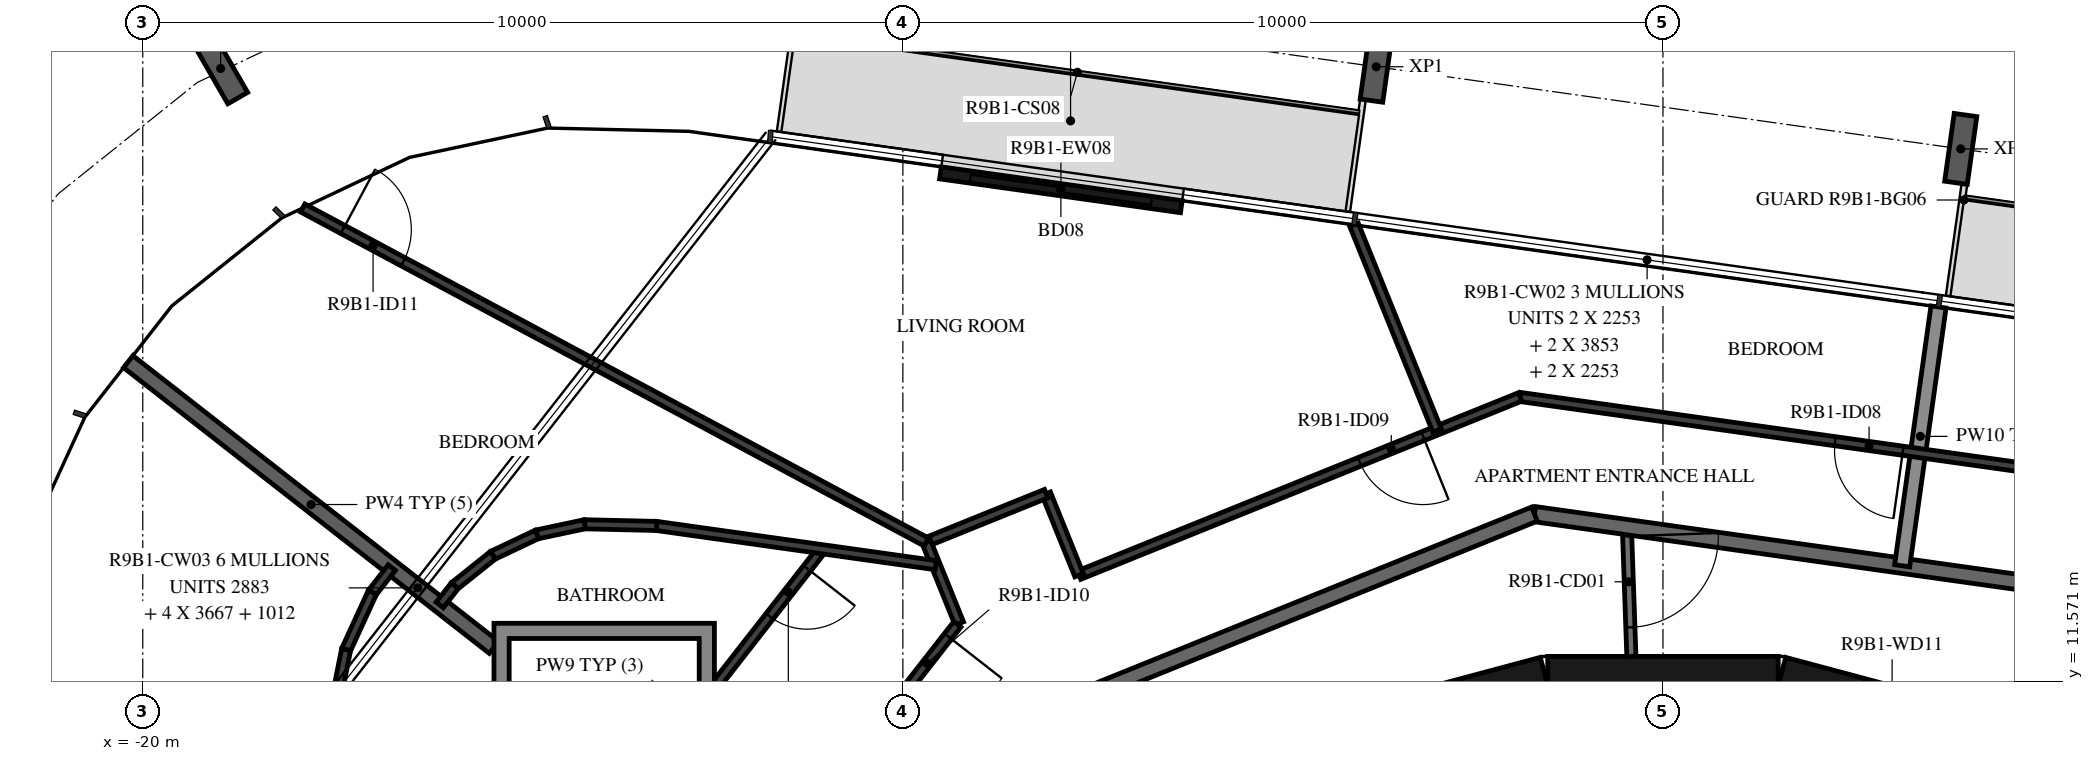
"""IFC4 building model, lengths in metres.
Left out: names, types, materials, properties, quantities, classifications, styles, units other than length and angle.
Written with IfcOpenShell. Run it as: python <this file> out.ifc"""

import sys

from ifc_helpers import new_model, si_unit, direction, frame, frame_2d, origin, origin_2d, place, context, subcontext, project, spatial, polyline, rectangle, i_section, outline, extrude, element, fill, save


model = new_model("IFC4")
c1 = context("Model", 3, precision=1e-05, world=origin(), true_north=direction((0.0, 1.0)))
c2 = subcontext(c1, "Body", "Model", "MODEL_VIEW")
j1 = project(units=[si_unit("LENGTHUNIT", "METRE"), si_unit("PLANEANGLEUNIT", "RADIAN")], contexts=[c1])
p1 = place(None, origin())
s1 = spatial("IfcSite", under=j1, at=p1, CompositionType="ELEMENT")
p2 = place(p1, origin())
s2 = spatial("IfcBuilding", under=s1, at=p2, CompositionType="ELEMENT")
p3 = place(p2, frame((0.0, 0.0, 350.5)))
s3 = spatial("IfcBuildingStorey", under=s2, at=p3, CompositionType="ELEMENT", Elevation=350.5)
for number, where, z_axis, x_axis in (
    (1, (3.917, 18.574, -0.38), (0.0, 0.0, 1.0), (0.99, -0.139, 0.0)),
    (2, (-3.773, 19.655, -0.38), (0.0, 0.0, 1.0), (0.99, -0.139, 0.0)),
    (3, (-18.976, 19.632, -0.38), (0.0, 0.0, 1.0), (0.866, 0.5, 0.0)),
):
    element("IfcColumn", number, at=place(p3, frame(where, z_axis=z_axis, x_axis=x_axis)), inside=s3, PredefinedType="COLUMN", context=c2, shape_type="SweptSolid", body=[
        extrude(i_section(OverallWidth=0.3, OverallDepth=0.9, WebThickness=0.019, FlangeThickness=0.035, FilletRadius=0.03, at=origin_2d()), origin(), (0.0, 0.0, 1.0), 3.5),
    ])
p4 = place(p3, frame((-6.337, 17.814, 0.0), z_axis=(0.0, 0.0, 1.0), x_axis=(-0.99026890462, 0.13916715325, 0.0)))
e4 = element("IfcWall", 4, at=p4, inside=s3, PredefinedType="STANDARD", context=c2, shape_type="SweptSolid", body=[
    extrude(rectangle(XDim=3.2, YDim=0.16, at=frame_2d((1.6, 0.0))), origin(), (0.0, 0.0, 1.0), 3.12),
])
p5 = place(p4, frame((0.4, 0.0, 0.0)))
e5 = element("IfcOpeningElement", 5, at=p5, cuts=e4, PredefinedType="OPENING", context=c2, shape_type="SweptSolid", body=[
    extrude(rectangle(XDim=2.4, YDim=2.4, at=frame_2d((1.2, 1.2))), frame((0.0, 0.09, 0.0), z_axis=(0.0, -1.0, 0.0), x_axis=(1.0, 0.0, 0.0)), (0.0, 0.0, 1.0), 0.18),
])
p6 = place(p3, frame((4.479, 10.858, 0.0), z_axis=(0.0, 0.0, 1.0), x_axis=(-0.965948410781, 0.258734743916, 0.0)))
e6 = element("IfcWall", 6, at=p6, inside=s3, PredefinedType="SHEAR", context=c2, shape_type="SweptSolid", body=[
    extrude(rectangle(XDim=3.033, YDim=0.5, at=frame_2d((1.516, 0.0))), origin(), (0.0, 0.0, 1.0), 3.12),
])
p7 = place(p6, frame((1.066, 0.0, 0.0)))
e7 = element("IfcOpeningElement", 7, at=p7, cuts=e6, PredefinedType="OPENING", context=c2, shape_type="SweptSolid", body=[
    extrude(rectangle(XDim=0.9, YDim=2.1, at=frame_2d((0.45, 1.05))), frame((0.0, 0.26, 0.0), z_axis=(0.0, -1.0, 0.0), x_axis=(1.0, 0.0, 0.0)), (0.0, 0.0, 1.0), 0.52),
])
for number, where, z_axis, x_axis in (
    (8, (1.516, 11.647, 0.0), (0.0, 0.0, 1.0), (-1.0, 0.0, 0.0)),
    (9, (-1.55, 11.643, 0.0), (0.0, 0.0, 1.0), (-0.966, -0.259, 0.0)),
):
    element("IfcWall", number, at=place(p3, frame(where, z_axis=z_axis, x_axis=x_axis)), inside=s3, PredefinedType="SHEAR", context=c2, shape_type="SweptSolid", body=[
        extrude(rectangle(XDim=3.033, YDim=0.5, at=frame_2d((1.516, 0.0))), origin(), (0.0, 0.0, 1.0), 3.12),
    ])
p8 = place(p3, frame((-0.475, 13.598, 0.0), z_axis=(0.0, 0.0, 1.0), x_axis=(0.034852521429, -0.999392466326, 0.0)))
e10 = element("IfcWall", 10, at=p8, inside=s3, PredefinedType="PARTITIONING", context=c2, shape_type="SweptSolid", body=[
    extrude(rectangle(XDim=1.702, YDim=0.12, at=frame_2d((0.851, 0.0))), origin(), (0.0, 0.0, 1.0), 3.12),
])
p9 = place(p8, frame((0.12, 0.0, 0.0)))
e11 = element("IfcOpeningElement", 11, at=p9, cuts=e10, PredefinedType="OPENING", context=c2, shape_type="SweptSolid", body=[
    extrude(rectangle(XDim=1.2, YDim=2.1, at=frame_2d((0.6, 1.05))), frame((0.0, 0.07, 0.0), z_axis=(0.0, -1.0, 0.0), x_axis=(1.0, 0.0, 0.0)), (0.0, 0.0, 1.0), 0.14),
])
p10 = place(p3, frame((5.42, 12.77, 0.0), z_axis=(0.0, 0.0, 1.0), x_axis=(-0.990270565508, 0.139155334385, 0.0)))
e12 = element("IfcWall", 12, at=p10, inside=s3, PredefinedType="STANDARD", context=c2, shape_type="SweptSolid", body=[
    extrude(rectangle(XDim=7.181, YDim=0.2, at=frame_2d((3.59, 0.0))), origin(), (0.0, 0.0, 1.0), 3.12),
])
p11 = place(p3, frame((-1.691, 13.769, 0.0), z_axis=(0.0, 0.0, 1.0), x_axis=(-0.92717916932, -0.374618189599, 0.0)))
e13 = element("IfcWall", 13, at=p11, inside=s3, PredefinedType="STANDARD", context=c2, shape_type="SweptSolid", body=[
    extrude(rectangle(XDim=7.181, YDim=0.2, at=frame_2d((3.591, 0.0))), origin(), (0.0, 0.0, 1.0), 3.12),
])
p12 = place(p3, frame((3.625, 16.494, 0.0), z_axis=(0.0, 0.0, 1.0), x_axis=(-0.139174320859, -0.990267897295, 0.0)))
e14 = element("IfcWall", 14, at=p12, inside=s3, PredefinedType="STANDARD", context=c2, shape_type="SweptSolid", body=[
    extrude(rectangle(XDim=3.438, YDim=0.2, at=frame_2d((1.719, 0.0))), origin(), (0.0, 0.0, 1.0), 2.73),
])
p13 = place(p3, frame((-20.191, 15.775, 0.0), z_axis=(0.0, 0.0, 1.0), x_axis=(0.788021948923, -0.615647145706, 0.0)))
e15 = element("IfcWall", 15, at=p13, inside=s3, PredefinedType="STANDARD", context=c2, shape_type="SweptSolid", body=[
    extrude(rectangle(XDim=6.106, YDim=0.2, at=frame_2d((3.053, 0.0))), origin(), (0.0, 0.0, 1.0), 3.12),
])
p14 = place(p3, frame((6.027, 14.199, 0.0), z_axis=(0.0, 0.0, 1.0), x_axis=(-0.990271593532, 0.139148018469, 0.0)))
e16 = element("IfcWall", 16, at=p14, inside=s3, PredefinedType="PARTITIONING", context=c2, shape_type="SweptSolid", body=[
    extrude(rectangle(XDim=7.985, YDim=0.12, at=frame_2d((3.992, 0.0))), origin(), (0.0, 0.0, 1.0), 3.12),
])
p15 = place(p14, frame((2.898, 0.0, 0.0)))
e17 = element("IfcOpeningElement", 17, at=p15, cuts=e16, PredefinedType="OPENING", context=c2, shape_type="SweptSolid", body=[
    extrude(rectangle(XDim=0.9, YDim=2.1, at=frame_2d((0.45, 1.05))), frame((0.0, 0.07, 0.0), z_axis=(0.0, -1.0, 0.0), x_axis=(1.0, 0.0, 0.0)), (0.0, 0.0, 1.0), 0.14),
])
p16 = place(p3, frame((-1.88, 15.311, 0.0), z_axis=(0.0, 0.0, 1.0), x_axis=(-0.927182163322, -0.374610779365, 0.0)))
e18 = element("IfcWall", 18, at=p16, inside=s3, PredefinedType="PARTITIONING", context=c2, shape_type="SweptSolid", body=[
    extrude(rectangle(XDim=6.257, YDim=0.12, at=frame_2d((3.128, 0.0))), origin(), (0.0, 0.0, 1.0), 3.12),
])
p17 = place(p16, frame((1.377, 0.0, 0.0)))
e19 = element("IfcOpeningElement", 19, at=p17, cuts=e18, PredefinedType="OPENING", context=c2, shape_type="SweptSolid", body=[
    extrude(rectangle(XDim=0.9, YDim=2.1, at=frame_2d((0.45, 1.05))), frame((0.0, 0.07, 0.0), z_axis=(0.0, -1.0, 0.0), x_axis=(1.0, 0.0, 0.0)), (0.0, 0.0, 1.0), 0.14),
])
p18 = place(p3, frame((-7.681, 12.967, 0.0), z_axis=(0.0, 0.0, 1.0), x_axis=(-0.374592224266, 0.927189659951, 0.0)))
e20 = element("IfcWall", 20, at=p18, inside=s3, PredefinedType="PARTITIONING", context=c2, shape_type="SweptSolid", body=[
    extrude(rectangle(XDim=1.156, YDim=0.12, at=frame_2d((0.578, 0.0))), origin(), (0.0, 0.0, 1.0), 3.12),
])
p19 = place(p3, frame((-8.115, 14.039, 0.0), z_axis=(0.0, 0.0, 1.0), x_axis=(-0.927153589835, -0.374681492546, 0.0)))
e21 = element("IfcWall", 21, at=p19, inside=s3, PredefinedType="PARTITIONING", context=c2, shape_type="SweptSolid", body=[
    extrude(rectangle(XDim=1.7, YDim=0.12, at=frame_2d((0.85, 0.0))), origin(), (0.0, 0.0, 1.0), 3.12),
])
p20 = place(p3, frame((-9.691, 13.402, 0.0), z_axis=(0.0, 0.0, 1.0), x_axis=(0.374484003097, -0.927233374844, 0.0)))
e22 = element("IfcWall", 22, at=p20, inside=s3, PredefinedType="PARTITIONING", context=c2, shape_type="SweptSolid", body=[
    extrude(rectangle(XDim=1.156, YDim=0.12, at=frame_2d((0.578, 0.0))), origin(), (0.0, 0.0, 1.0), 3.12),
])
p21 = place(p3, frame((-9.283, 12.319, 0.0), z_axis=(0.0, 0.0, 1.0), x_axis=(-0.61567489546, -0.788000268464, 0.0)))
e23 = element("IfcWall", 23, at=p21, inside=s3, PredefinedType="PARTITIONING", context=c2, shape_type="SweptSolid", body=[
    extrude(rectangle(XDim=7.985, YDim=0.12, at=frame_2d((3.992, 0.0))), origin(), (0.0, 0.0, 1.0), 3.12),
])
p22 = place(p21, frame((0.2, 0.0, 0.0)))
e24 = element("IfcOpeningElement", 24, at=p22, cuts=e23, PredefinedType="OPENING", context=c2, shape_type="SweptSolid", body=[
    extrude(rectangle(XDim=0.9, YDim=2.1, at=frame_2d((0.45, 1.05))), frame((0.0, 0.07, 0.0), z_axis=(0.0, -1.0, 0.0), x_axis=(1.0, 0.0, 0.0)), (0.0, 0.0, 1.0), 0.14),
])
p23 = place(p21, frame((4.592, 0.0, 0.0)))
e25 = element("IfcOpeningElement", 25, at=p23, cuts=e23, PredefinedType="OPENING", context=c2, shape_type="SweptSolid", body=[
    extrude(rectangle(XDim=0.9, YDim=2.1, at=frame_2d((0.45, 1.05))), frame((0.0, 0.07, 0.0), z_axis=(0.0, -1.0, 0.0), x_axis=(1.0, 0.0, 0.0)), (0.0, 0.0, 1.0), 0.14),
])
p24 = place(p3, frame((-4.065, 17.575, 0.0), z_axis=(0.0, 0.0, 1.0), x_axis=(0.374619347258, -0.927178701578, 0.0)))
e26 = element("IfcWall", 26, at=p24, inside=s3, PredefinedType="PARTITIONING", context=c2, shape_type="SweptSolid", body=[
    extrude(rectangle(XDim=2.918, YDim=0.12, at=frame_2d((1.459, 0.0))), origin(), (0.0, 0.0, 1.0), 3.12),
])
p25 = place(p3, frame((-17.896, 17.797, 0.0), z_axis=(0.0, 0.0, 1.0), x_axis=(0.88150492406, -0.4721748287, 0.0)))
e27 = element("IfcWall", 27, at=p25, inside=s3, PredefinedType="PARTITIONING", context=c2, shape_type="SweptSolid", body=[
    extrude(rectangle(XDim=9.308, YDim=0.12, at=frame_2d((4.654, 0.0))), origin(), (0.0, 0.0, 1.0), 3.12),
])
p26 = place(p25, frame((0.6, 0.0, 0.0)))
e28 = element("IfcOpeningElement", 28, at=p26, cuts=e27, PredefinedType="OPENING", context=c2, shape_type="SweptSolid", body=[
    extrude(rectangle(XDim=0.9, YDim=2.1, at=frame_2d((0.45, 1.05))), frame((0.0, 0.07, 0.0), z_axis=(0.0, -1.0, 0.0), x_axis=(1.0, 0.0, 0.0)), (0.0, 0.0, 1.0), 0.14),
])
p27 = place(p3, frame((-11.064, 13.308, 0.0), z_axis=(0.0, 0.0, 1.0), x_axis=(-0.615681126827, -0.787995399777, 0.0)))
e29 = element("IfcWall", 29, at=p27, inside=s3, PredefinedType="PARTITIONING", context=c2, shape_type="SweptSolid", body=[
    extrude(rectangle(XDim=2.3, YDim=0.12, at=frame_2d((1.15, 0.0))), origin(), (0.0, 0.0, 1.0), 3.12),
])
p28 = place(p27, frame((0.32, 0.0, 0.0)))
e30 = element("IfcOpeningElement", 30, at=p28, cuts=e29, PredefinedType="OPENING", context=c2, shape_type="SweptSolid", body=[
    extrude(rectangle(XDim=0.8, YDim=2.1, at=frame_2d((0.4, 1.05))), frame((0.0, 0.07, 0.0), z_axis=(0.0, -1.0, 0.0), x_axis=(1.0, 0.0, 0.0)), (0.0, 0.0, 1.0), 0.14),
])
p29 = place(p3, frame((-9.568, 13.097, 0.0), z_axis=(0.0, 0.0, 1.0), x_axis=(-0.990266931728, 0.13918119099, 0.0)))
e31 = element("IfcWall", 31, at=p29, inside=s3, PredefinedType="PARTITIONING", context=c2, shape_type="SweptSolid", body=[
    extrude(rectangle(XDim=3.708, YDim=0.12, at=frame_2d((1.854, 0.0))), origin(), (0.0, 0.0, 1.0), 3.12),
])
p30 = place(p3, frame((-13.24, 13.614, 0.0), z_axis=(0.0, 0.0, 1.0), x_axis=(-0.999730529074, 0.023213557177, 0.0)))
e32 = element("IfcWall", 32, at=p30, inside=s3, PredefinedType="PARTITIONING", context=c2, shape_type="SweptSolid", body=[
    extrude(rectangle(XDim=0.947, YDim=0.12, at=frame_2d((0.473, 0.0))), origin(), (0.0, 0.0, 1.0), 3.12),
])
p31 = place(p3, frame((-14.186, 13.635, 0.0), z_axis=(0.0, 0.0, 1.0), x_axis=(-0.978217752025, -0.207581380725, 0.0)))
e33 = element("IfcWall", 33, at=p31, inside=s3, PredefinedType="PARTITIONING", context=c2, shape_type="SweptSolid", body=[
    extrude(rectangle(XDim=0.642, YDim=0.12, at=frame_2d((0.321, 0.0))), origin(), (0.0, 0.0, 1.0), 3.12),
])
for number, where, z_axis, x_axis in (
    (34, (-14.814, 13.502, 0.0), (0.0, 0.0, 1.0), (-0.904, -0.428, 0.0)),
    (35, (-15.395, 13.227, 0.0), (0.0, 0.0, 1.0), (-0.781, -0.625, 0.0)),
):
    element("IfcWall", number, at=place(p3, frame(where, z_axis=z_axis, x_axis=x_axis)), inside=s3, PredefinedType="PARTITIONING", context=c2, shape_type="SweptSolid", body=[
        extrude(rectangle(XDim=0.642, YDim=0.12, at=frame_2d((0.321, 0.0))), origin(), (0.0, 0.0, 1.0), 3.12),
    ])
p32 = place(p3, frame((-15.896, 12.826, 0.0), z_axis=(0.0, 0.0, 1.0), x_axis=(-0.615466865985, -0.788162760396, 0.0)))
e36 = element("IfcWall", 36, at=p32, inside=s3, PredefinedType="PARTITIONING", context=c2, shape_type="SweptSolid", body=[
    extrude(rectangle(XDim=0.321, YDim=0.12, at=frame_2d((0.16, 0.0))), origin(), (0.0, 0.0, 1.0), 3.12),
])
p33 = place(p3, frame((-16.724, 13.066, 0.0), z_axis=(0.0, 0.0, 1.0), x_axis=(-0.615895388651, -0.787827944565, 0.0)))
e37 = element("IfcWall", 37, at=p33, inside=s3, PredefinedType="PARTITIONING", context=c2, shape_type="SweptSolid", body=[
    extrude(rectangle(XDim=0.415, YDim=0.12, at=frame_2d((0.207, 0.0))), origin(), (0.0, 0.0, 1.0), 3.12),
])
for number, where, z_axis, x_axis in (
    (38, (-16.979, 12.74, 0.0), (0.0, 0.0, 1.0), (-0.417, -0.909, 0.0)),
    (39, (-17.325, 11.986, 0.0), (0.0, 0.0, 1.0), (-0.197, -0.98, 0.0)),
):
    element("IfcWall", number, at=place(p3, frame(where, z_axis=z_axis, x_axis=x_axis)), inside=s3, PredefinedType="PARTITIONING", context=c2, shape_type="SweptSolid", body=[
        extrude(rectangle(XDim=0.829, YDim=0.12, at=frame_2d((0.415, 0.0))), origin(), (0.0, 0.0, 1.0), 3.12),
    ])
p34 = place(p3, origin())
e40 = element("IfcWall", 40, at=p34, inside=s3, PredefinedType="STANDARD", context=c2, shape_type="SweptSolid", body=[
    extrude(outline(polyline([(-12.479, 12.333), (-12.479, 9.433), (-15.379, 9.433), (-15.379, 12.333), (-12.479, 12.333)]), holes=[polyline([(-15.179, 9.633), (-12.679, 9.633), (-12.679, 12.133), (-15.179, 12.133), (-15.179, 9.633)])]), origin(), (0.0, 0.0, 1.0), 3.12),
])
p35 = place(p5, origin())
e41 = element("IfcDoor", 41, at=p35, inside=s3, OperationType="DOUBLE_DOOR_SLIDING", PredefinedType="DOOR", context=c2, shape_type="SweptSolid", body=[
    extrude(rectangle(XDim=2.4, YDim=2.4, at=frame_2d((1.2, 1.2))), frame((0.0, 0.025, 0.0), z_axis=(0.0, -1.0, 0.0), x_axis=(1.0, 0.0, 0.0)), (0.0, 0.0, 1.0), 0.05),
])
fill(e5, e41)
p36 = place(p15, origin())
e42 = element("IfcDoor", 42, at=p36, inside=s3, OperationType="SINGLE_SWING_LEFT", PredefinedType="DOOR", context=c2, shape_type="SweptSolid", body=[
    extrude(rectangle(XDim=0.9, YDim=2.1, at=frame_2d((0.45, 1.05))), frame((0.0, 0.025, 0.0), z_axis=(0.0, -1.0, 0.0), x_axis=(1.0, 0.0, 0.0)), (0.0, 0.0, 1.0), 0.05),
])
fill(e17, e42)
p37 = place(p17, origin())
e43 = element("IfcDoor", 43, at=p37, inside=s3, OperationType="SINGLE_SWING_RIGHT", PredefinedType="DOOR", context=c2, shape_type="SweptSolid", body=[
    extrude(rectangle(XDim=0.9, YDim=2.1, at=frame_2d((0.45, 1.05))), frame((0.0, 0.025, 0.0), z_axis=(0.0, -1.0, 0.0), x_axis=(1.0, 0.0, 0.0)), (0.0, 0.0, 1.0), 0.05),
])
fill(e19, e43)
p38 = place(p22, origin())
e44 = element("IfcDoor", 44, at=p38, inside=s3, OperationType="SINGLE_SWING_RIGHT", PredefinedType="DOOR", context=c2, shape_type="SweptSolid", body=[
    extrude(rectangle(XDim=0.9, YDim=2.1, at=frame_2d((0.45, 1.05))), frame((0.0, 0.025, 0.0), z_axis=(0.0, -1.0, 0.0), x_axis=(1.0, 0.0, 0.0)), (0.0, 0.0, 1.0), 0.05),
])
fill(e24, e44)
p39 = place(p28, origin())
e45 = element("IfcDoor", 45, at=p39, inside=s3, OperationType="SINGLE_SWING_RIGHT", PredefinedType="DOOR", context=c2, shape_type="SweptSolid", body=[
    extrude(rectangle(XDim=0.8, YDim=2.1, at=frame_2d((0.4, 1.05))), frame((0.0, 0.025, 0.0), z_axis=(0.0, -1.0, 0.0), x_axis=(1.0, 0.0, 0.0)), (0.0, 0.0, 1.0), 0.05),
])
fill(e30, e45)
p40 = place(p26, origin())
e46 = element("IfcDoor", 46, at=p40, inside=s3, OperationType="SINGLE_SWING_RIGHT", PredefinedType="DOOR", context=c2, shape_type="SweptSolid", body=[
    extrude(rectangle(XDim=0.9, YDim=2.1, at=frame_2d((0.45, 1.05))), frame((0.0, 0.025, 0.0), z_axis=(0.0, -1.0, 0.0), x_axis=(1.0, 0.0, 0.0)), (0.0, 0.0, 1.0), 0.05),
])
fill(e28, e46)
p41 = place(p9, origin())
e47 = element("IfcDoor", 47, at=p41, inside=s3, OperationType="DOUBLE_DOOR_SINGLE_SWING", PredefinedType="DOOR", context=c2, shape_type="SweptSolid", body=[
    extrude(rectangle(XDim=1.2, YDim=2.1, at=frame_2d((0.6, 1.05))), frame((0.0, 0.025, 0.0), z_axis=(0.0, -1.0, 0.0), x_axis=(1.0, 0.0, 0.0)), (0.0, 0.0, 1.0), 0.05),
])
fill(e11, e47)
save(model, sys.argv[1])
